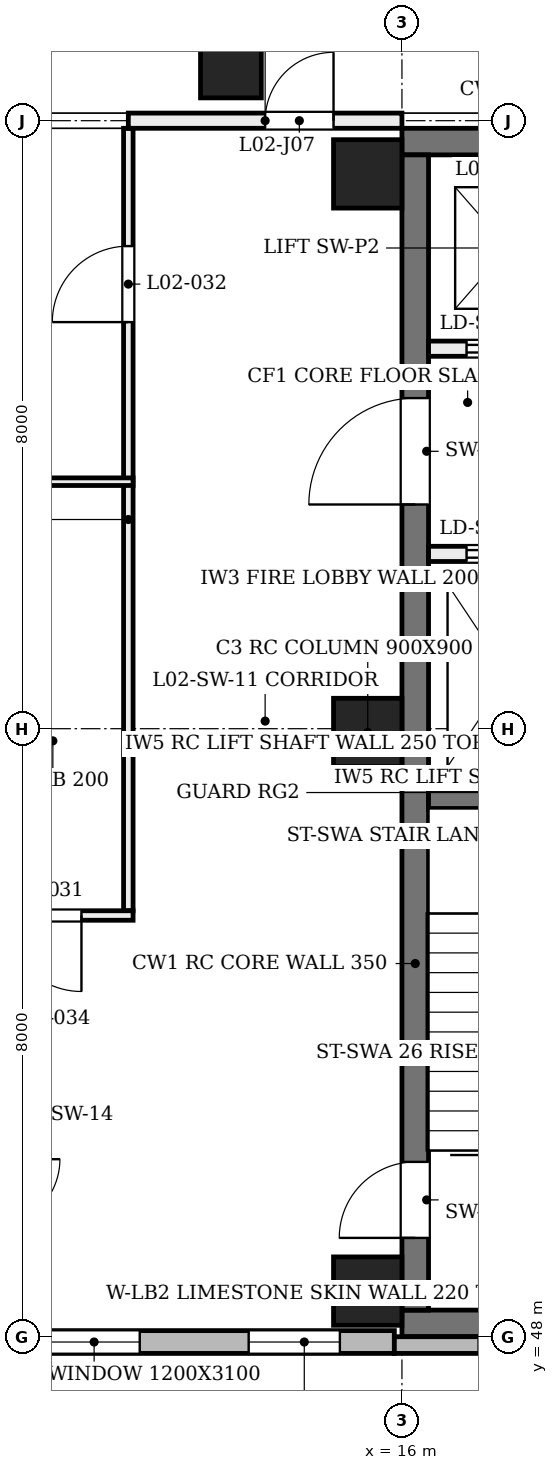
"""IFC4 building model, lengths in metres.
Left out: names, types, materials, properties, quantities, classifications, styles, units other than length and angle.
Written with IfcOpenShell. Run it as: python <this file> out.ifc"""

import sys

from ifc_helpers import new_model, si_unit, direction, frame, frame_2d, origin, origin_2d, place, context, subcontext, project, spatial, rectangle, extrude, element, fill, save


model = new_model("IFC4")
c1 = context("Model", 3, precision=1e-05, world=origin(), true_north=direction((0.0, 1.0)))
c2 = subcontext(c1, "Body", "Model", "MODEL_VIEW")
j1 = project(units=[si_unit("LENGTHUNIT", "METRE"), si_unit("PLANEANGLEUNIT", "RADIAN")], contexts=[c1])
p1 = place(None, origin())
s1 = spatial("IfcSite", under=j1, at=p1, CompositionType="ELEMENT")
p2 = place(p1, origin())
s2 = spatial("IfcBuilding", under=s1, at=p2, CompositionType="ELEMENT")
p3 = place(p2, frame((0.0, 0.0, 9.6)))
s3 = spatial("IfcBuildingStorey", under=s2, at=p3, CompositionType="ELEMENT", Elevation=9.6)
for number, where, z_axis, x_axis in (
    (1, (16.0, 48.175, 0.0), (0.0, 0.0, 1.0), (1.0, 0.0, 0.0)),
    (2, (16.0, 63.725, 0.0), (0.0, 0.0, 1.0), (1.0, 0.0, 0.0)),
):
    element("IfcWall", number, at=place(p3, frame(where, z_axis=z_axis, x_axis=x_axis)), inside=s3, PredefinedType="SHEAR", context=c2, shape_type="SweptSolid", body=[
        extrude(rectangle(XDim=7.9, YDim=0.35, at=frame_2d((3.95, 0.0))), origin(), (0.0, 0.0, 1.0), 4.58),
    ])
p4 = place(p3, frame((16.175, 48.35, 0.0), z_axis=(0.0, 0.0, 1.0), x_axis=(0.0, 1.0, 0.0)))
e3 = element("IfcWall", 3, at=p4, inside=s3, PredefinedType="SHEAR", context=c2, shape_type="SweptSolid", body=[
    extrude(rectangle(XDim=15.2, YDim=0.35, at=frame_2d((7.6, 0.0))), origin(), (0.0, 0.0, 1.0), 4.58),
])
p5 = place(p4, frame((0.95, 0.0, 0.0)))
e4 = element("IfcOpeningElement", 4, at=p5, cuts=e3, PredefinedType="OPENING", context=c2, shape_type="SweptSolid", body=[
    extrude(rectangle(XDim=1.0, YDim=2.1, at=frame_2d((0.5, 1.05))), frame((0.0, 0.185, 0.0), z_axis=(0.0, -1.0, 0.0), x_axis=(1.0, 0.0, 0.0)), (0.0, 0.0, 1.0), 0.37),
])
p6 = place(p4, frame((10.6, 0.0, 0.0)))
e5 = element("IfcOpeningElement", 5, at=p6, cuts=e3, PredefinedType="OPENING", context=c2, shape_type="SweptSolid", body=[
    extrude(rectangle(XDim=1.4, YDim=2.1, at=frame_2d((0.7, 1.05))), frame((0.0, 0.185, 0.0), z_axis=(0.0, -1.0, 0.0), x_axis=(1.0, 0.0, 0.0)), (0.0, 0.0, 1.0), 0.37),
])
for number, where, z_axis, x_axis in (
    (6, (15.55, 48.6, 0.0), (0.0, 0.0, 1.0), (1.0, 0.0, 0.0)),
    (7, (15.55, 55.95, 0.0), (0.0, 0.0, 1.0), (1.0, 0.0, 0.0)),
    (8, (15.55, 63.3, 0.0), (0.0, 0.0, 1.0), (1.0, 0.0, 0.0)),
):
    element("IfcColumn", number, at=place(p3, frame(where, z_axis=z_axis, x_axis=x_axis)), inside=s3, PredefinedType="COLUMN", context=c2, shape_type="SweptSolid", body=[
        extrude(rectangle(XDim=0.9, YDim=0.9, at=origin_2d()), origin(), (0.0, 0.0, 1.0), 4.8),
    ])
p7 = place(p3, frame((14.0, 64.7, 0.0), z_axis=(-0.203962208122, 0.0, 0.978978762618), x_axis=(0.0, -1.0, 0.0)))
e9 = element("IfcColumn", 9, at=p7, inside=s3, PredefinedType="COLUMN", context=c2, shape_type="SweptSolid", body=[
    extrude(rectangle(XDim=0.8, YDim=0.8, at=origin_2d()), origin(), (0.0, 0.0, 1.0), 4.903),
])
p8 = place(p3, frame((8.0, 47.93, 0.0), z_axis=(0.0, 0.0, 1.0), x_axis=(1.0, 0.0, 0.0)))
e10 = element("IfcWall", 10, at=p8, inside=s3, PredefinedType="SOLIDWALL", context=c2, shape_type="SweptSolid", body=[
    extrude(rectangle(XDim=7.9, YDim=0.3, at=frame_2d((3.95, 0.0))), origin(), (0.0, 0.0, 1.0), 3.9),
])
p9 = place(p8, frame((0.717, 0.0, 0.75)))
e11 = element("IfcOpeningElement", 11, at=p9, cuts=e10, PredefinedType="OPENING", context=c2, shape_type="SweptSolid", body=[
    extrude(rectangle(XDim=1.2, YDim=3.1, at=frame_2d((0.6, 1.55))), frame((0.0, 0.16, 0.0), z_axis=(0.0, -1.0, 0.0), x_axis=(1.0, 0.0, 0.0)), (0.0, 0.0, 1.0), 0.32),
])
p10 = place(p8, frame((3.35, 0.0, 0.75)))
e12 = element("IfcOpeningElement", 12, at=p10, cuts=e10, PredefinedType="OPENING", context=c2, shape_type="SweptSolid", body=[
    extrude(rectangle(XDim=1.2, YDim=3.1, at=frame_2d((0.6, 1.55))), frame((0.0, 0.16, 0.0), z_axis=(0.0, -1.0, 0.0), x_axis=(1.0, 0.0, 0.0)), (0.0, 0.0, 1.0), 0.32),
])
p11 = place(p8, frame((5.983, 0.0, 0.75)))
e13 = element("IfcOpeningElement", 13, at=p11, cuts=e10, PredefinedType="OPENING", context=c2, shape_type="SweptSolid", body=[
    extrude(rectangle(XDim=1.2, YDim=3.1, at=frame_2d((0.6, 1.55))), frame((0.0, 0.16, 0.0), z_axis=(0.0, -1.0, 0.0), x_axis=(1.0, 0.0, 0.0)), (0.0, 0.0, 1.0), 0.32),
])
p12 = place(p3, frame((15.9, 47.89, 0.0), z_axis=(0.0, 0.0, 1.0), x_axis=(1.0, 0.0, 0.0)))
e14 = element("IfcWall", 14, at=p12, inside=s3, PredefinedType="SOLIDWALL", context=c2, shape_type="SweptSolid", body=[
    extrude(rectangle(XDim=8.2, YDim=0.22, at=frame_2d((4.1, 0.0))), origin(), (0.0, 0.0, 1.0), 3.9),
])
p13 = place(p12, frame((1.108, 0.0, 0.9)))
e15 = element("IfcOpeningElement", 15, at=p13, cuts=e14, PredefinedType="OPENING", context=c2, shape_type="SweptSolid", body=[
    extrude(rectangle(XDim=0.45, YDim=2.6, at=frame_2d((0.225, 1.3))), frame((0.0, 0.12, 0.0), z_axis=(0.0, -1.0, 0.0), x_axis=(1.0, 0.0, 0.0)), (0.0, 0.0, 1.0), 0.24),
])
p14 = place(p12, frame((3.775, 0.0, 0.9)))
e16 = element("IfcOpeningElement", 16, at=p14, cuts=e14, PredefinedType="OPENING", context=c2, shape_type="SweptSolid", body=[
    extrude(rectangle(XDim=0.45, YDim=2.6, at=frame_2d((0.225, 1.3))), frame((0.0, 0.12, 0.0), z_axis=(0.0, -1.0, 0.0), x_axis=(1.0, 0.0, 0.0)), (0.0, 0.0, 1.0), 0.24),
])
p15 = place(p12, frame((6.442, 0.0, 0.9)))
e17 = element("IfcOpeningElement", 17, at=p15, cuts=e14, PredefinedType="OPENING", context=c2, shape_type="SweptSolid", body=[
    extrude(rectangle(XDim=0.45, YDim=2.6, at=frame_2d((0.225, 1.3))), frame((0.0, 0.12, 0.0), z_axis=(0.0, -1.0, 0.0), x_axis=(1.0, 0.0, 0.0)), (0.0, 0.0, 1.0), 0.24),
])
p16 = place(p3, frame((16.35, 55.075, 0.0), z_axis=(0.0, 0.0, 1.0), x_axis=(1.0, 0.0, 0.0)))
e18 = element("IfcWall", 18, at=p16, inside=s3, PredefinedType="SOLIDWALL", context=c2, shape_type="SweptSolid", body=[
    extrude(rectangle(XDim=3.1, YDim=0.25, at=frame_2d((1.55, 0.0))), origin(), (0.0, 0.0, 1.0), 4.55),
])
p17 = place(p3, frame((16.35, 58.3, 0.0), z_axis=(0.0, 0.0, 1.0), x_axis=(1.0, 0.0, 0.0)))
e19 = element("IfcWall", 19, at=p17, inside=s3, PredefinedType="SOLIDWALL", context=c2, shape_type="SweptSolid", body=[
    extrude(rectangle(XDim=7.2, YDim=0.2, at=frame_2d((3.6, 0.0))), origin(), (0.0, 0.0, 1.0), 4.55),
])
p18 = place(p17, frame((0.5, 0.0, 0.0)))
e20 = element("IfcOpeningElement", 20, at=p18, cuts=e19, PredefinedType="OPENING", context=c2, shape_type="SweptSolid", body=[
    extrude(rectangle(XDim=1.1, YDim=2.1, at=frame_2d((0.55, 1.05))), frame((0.0, 0.11, 0.0), z_axis=(0.0, -1.0, 0.0), x_axis=(1.0, 0.0, 0.0)), (0.0, 0.0, 1.0), 0.22),
])
p19 = place(p17, frame((5.6, 0.0, 0.0)))
e21 = element("IfcOpeningElement", 21, at=p19, cuts=e19, PredefinedType="OPENING", context=c2, shape_type="SweptSolid", body=[
    extrude(rectangle(XDim=1.1, YDim=2.1, at=frame_2d((0.55, 1.05))), frame((0.0, 0.11, 0.0), z_axis=(0.0, -1.0, 0.0), x_axis=(1.0, 0.0, 0.0)), (0.0, 0.0, 1.0), 0.22),
])
p20 = place(p17, frame((3.1, 0.0, 0.0)))
e22 = element("IfcOpeningElement", 22, at=p20, cuts=e19, PredefinedType="OPENING", context=c2, shape_type="SweptSolid", body=[
    extrude(rectangle(XDim=1.0, YDim=2.1, at=frame_2d((0.5, 1.05))), frame((0.0, 0.11, 0.0), z_axis=(0.0, -1.0, 0.0), x_axis=(1.0, 0.0, 0.0)), (0.0, 0.0, 1.0), 0.22),
])
p21 = place(p3, frame((16.35, 61.0, 0.0), z_axis=(0.0, 0.0, 1.0), x_axis=(1.0, 0.0, 0.0)))
e23 = element("IfcWall", 23, at=p21, inside=s3, PredefinedType="SOLIDWALL", context=c2, shape_type="SweptSolid", body=[
    extrude(rectangle(XDim=7.2, YDim=0.2, at=frame_2d((3.6, 0.0))), origin(), (0.0, 0.0, 1.0), 4.55),
])
p22 = place(p21, frame((0.5, 0.0, 0.0)))
e24 = element("IfcOpeningElement", 24, at=p22, cuts=e23, PredefinedType="OPENING", context=c2, shape_type="SweptSolid", body=[
    extrude(rectangle(XDim=1.1, YDim=2.1, at=frame_2d((0.55, 1.05))), frame((0.0, 0.11, 0.0), z_axis=(0.0, -1.0, 0.0), x_axis=(1.0, 0.0, 0.0)), (0.0, 0.0, 1.0), 0.22),
])
p23 = place(p21, frame((5.6, 0.0, 0.0)))
e25 = element("IfcOpeningElement", 25, at=p23, cuts=e23, PredefinedType="OPENING", context=c2, shape_type="SweptSolid", body=[
    extrude(rectangle(XDim=1.1, YDim=2.1, at=frame_2d((0.55, 1.05))), frame((0.0, 0.11, 0.0), z_axis=(0.0, -1.0, 0.0), x_axis=(1.0, 0.0, 0.0)), (0.0, 0.0, 1.0), 0.22),
])
p24 = place(p21, frame((3.1, 0.0, 0.0)))
e26 = element("IfcOpeningElement", 26, at=p24, cuts=e23, PredefinedType="OPENING", context=c2, shape_type="SweptSolid", body=[
    extrude(rectangle(XDim=1.0, YDim=2.1, at=frame_2d((0.5, 1.05))), frame((0.0, 0.11, 0.0), z_axis=(0.0, -1.0, 0.0), x_axis=(1.0, 0.0, 0.0)), (0.0, 0.0, 1.0), 0.22),
])
p25 = place(p3, frame((12.4, 53.605, 0.0), z_axis=(0.0, 0.0, 1.0), x_axis=(0.0, 1.0, 0.0)))
e27 = element("IfcWall", 27, at=p25, inside=s3, PredefinedType="PARTITIONING", context=c2, shape_type="SweptSolid", body=[
    extrude(rectangle(XDim=10.295, YDim=0.125, at=frame_2d((5.147, 0.0))), origin(), (0.0, 0.0, 1.0), 3.88),
])
p26 = place(p25, frame((7.745, 0.0, 0.0)))
e28 = element("IfcOpeningElement", 28, at=p26, cuts=e27, PredefinedType="OPENING", context=c2, shape_type="SweptSolid", body=[
    extrude(rectangle(XDim=1.0, YDim=2.1, at=frame_2d((0.5, 1.05))), frame((0.0, 0.073, 0.0), z_axis=(0.0, -1.0, 0.0), x_axis=(1.0, 0.0, 0.0)), (0.0, 0.0, 1.0), 0.145),
])
p27 = place(p3, frame((10.538, 53.542, 0.0), z_axis=(0.0, 0.0, 1.0), x_axis=(1.0, 0.0, 0.0)))
e29 = element("IfcWall", 29, at=p27, inside=s3, PredefinedType="PARTITIONING", context=c2, shape_type="SweptSolid", body=[
    extrude(rectangle(XDim=1.925, YDim=0.125, at=frame_2d((0.962, 0.0))), origin(), (0.0, 0.0, 1.0), 4.56),
])
p28 = place(p27, frame((0.246, 0.0, 0.0)))
e30 = element("IfcOpeningElement", 30, at=p28, cuts=e29, PredefinedType="OPENING", context=c2, shape_type="SweptSolid", body=[
    extrude(rectangle(XDim=1.0, YDim=2.1, at=frame_2d((0.5, 1.05))), frame((0.0, 0.073, 0.0), z_axis=(0.0, -1.0, 0.0), x_axis=(1.0, 0.0, 0.0)), (0.0, 0.0, 1.0), 0.145),
])
p29 = place(p3, frame((8.3, 59.25, 0.0), z_axis=(0.0, 0.0, 1.0), x_axis=(1.0, 0.0, 0.0)))
e31 = element("IfcWall", 31, at=p29, inside=s3, PredefinedType="PARTITIONING", context=c2, shape_type="SweptSolid", body=[
    extrude(rectangle(XDim=4.162, YDim=0.1, at=frame_2d((2.081, 0.0))), origin(), (0.0, 0.0, 1.0), 3.98),
])
p30 = place(p3, frame((12.4, 64.0, 0.0), z_axis=(0.0, 0.0, 1.0), x_axis=(1.0, 0.0, 0.0)))
e32 = element("IfcWall", 32, at=p30, inside=s3, PredefinedType="PARTITIONING", context=c2, shape_type="SweptSolid", body=[
    extrude(rectangle(XDim=3.6, YDim=0.2, at=frame_2d((1.8, 0.0))), origin(), (0.0, 0.0, 1.0), 3.88),
])
p31 = place(p30, frame((1.8, 0.0, 0.0)))
e33 = element("IfcOpeningElement", 33, at=p31, cuts=e32, PredefinedType="OPENING", context=c2, shape_type="SweptSolid", body=[
    extrude(rectangle(XDim=0.9, YDim=2.1, at=frame_2d((0.45, 1.05))), frame((0.0, 0.11, 0.0), z_axis=(0.0, -1.0, 0.0), x_axis=(1.0, 0.0, 0.0)), (0.0, 0.0, 1.0), 0.22),
])
p32 = place(p10, origin())
e34 = element("IfcWindow", 34, at=p32, inside=s3, PartitioningType="SINGLE_PANEL", PredefinedType="WINDOW", context=c2, shape_type="SweptSolid", body=[
    extrude(rectangle(XDim=1.2, YDim=3.1, at=frame_2d((0.6, 1.55))), frame((0.0, 0.03, 0.0), z_axis=(0.0, -1.0, 0.0), x_axis=(1.0, 0.0, 0.0)), (0.0, 0.0, 1.0), 0.06),
])
fill(e12, e34)
p33 = place(p11, origin())
e35 = element("IfcWindow", 35, at=p33, inside=s3, PartitioningType="SINGLE_PANEL", PredefinedType="WINDOW", context=c2, shape_type="SweptSolid", body=[
    extrude(rectangle(XDim=1.2, YDim=3.1, at=frame_2d((0.6, 1.55))), frame((0.0, 0.03, 0.0), z_axis=(0.0, -1.0, 0.0), x_axis=(1.0, 0.0, 0.0)), (0.0, 0.0, 1.0), 0.06),
])
fill(e13, e35)
p34 = place(p5, origin())
e36 = element("IfcDoor", 36, at=p34, inside=s3, OperationType="SINGLE_SWING_LEFT", PredefinedType="DOOR", context=c2, shape_type="SweptSolid", body=[
    extrude(rectangle(XDim=1.0, YDim=2.1, at=frame_2d((0.5, 1.05))), frame((0.0, 0.025, 0.0), z_axis=(0.0, -1.0, 0.0), x_axis=(1.0, 0.0, 0.0)), (0.0, 0.0, 1.0), 0.05),
])
fill(e4, e36)
p35 = place(p18, origin())
e37 = element("IfcDoor", 37, at=p35, inside=s3, OperationType="DOUBLE_DOOR_SLIDING", PredefinedType="DOOR", context=c2, shape_type="SweptSolid", body=[
    extrude(rectangle(XDim=1.1, YDim=2.1, at=frame_2d((0.55, 1.05))), frame((0.0, 0.025, 0.0), z_axis=(0.0, -1.0, 0.0), x_axis=(1.0, 0.0, 0.0)), (0.0, 0.0, 1.0), 0.05),
])
fill(e20, e37)
p36 = place(p22, frame((1.1, 0.0, 0.0), z_axis=(0.0, 0.0, 1.0), x_axis=(-1.0, 0.0, 0.0)))
e38 = element("IfcDoor", 38, at=p36, inside=s3, OperationType="DOUBLE_DOOR_SLIDING", PredefinedType="DOOR", context=c2, shape_type="SweptSolid", body=[
    extrude(rectangle(XDim=1.1, YDim=2.1, at=frame_2d((0.55, 1.05))), frame((0.0, 0.025, 0.0), z_axis=(0.0, -1.0, 0.0), x_axis=(1.0, 0.0, 0.0)), (0.0, 0.0, 1.0), 0.05),
])
fill(e24, e38)
p37 = place(p6, origin())
e39 = element("IfcDoor", 39, at=p37, inside=s3, OperationType="SINGLE_SWING_LEFT", PredefinedType="DOOR", context=c2, shape_type="SweptSolid", body=[
    extrude(rectangle(XDim=1.4, YDim=2.1, at=frame_2d((0.7, 1.05))), frame((0.0, 0.025, 0.0), z_axis=(0.0, -1.0, 0.0), x_axis=(1.0, 0.0, 0.0)), (0.0, 0.0, 1.0), 0.05),
])
fill(e5, e39)
p38 = place(p28, origin())
e40 = element("IfcDoor", 40, at=p38, inside=s3, OperationType="SINGLE_SWING_RIGHT", PredefinedType="DOOR", context=c2, shape_type="SweptSolid", body=[
    extrude(rectangle(XDim=1.0, YDim=2.1, at=frame_2d((0.5, 1.05))), frame((0.0, 0.025, 0.0), z_axis=(0.0, -1.0, 0.0), x_axis=(1.0, 0.0, 0.0)), (0.0, 0.0, 1.0), 0.05),
])
fill(e30, e40)
p39 = place(p26, origin())
e41 = element("IfcDoor", 41, at=p39, inside=s3, OperationType="SINGLE_SWING_LEFT", PredefinedType="DOOR", context=c2, shape_type="SweptSolid", body=[
    extrude(rectangle(XDim=1.0, YDim=2.1, at=frame_2d((0.5, 1.05))), frame((0.0, 0.025, 0.0), z_axis=(0.0, -1.0, 0.0), x_axis=(1.0, 0.0, 0.0)), (0.0, 0.0, 1.0), 0.05),
])
fill(e28, e41)
p40 = place(p31, frame((0.9, 0.0, 0.0), z_axis=(0.0, 0.0, 1.0), x_axis=(-1.0, 0.0, 0.0)))
e42 = element("IfcDoor", 42, at=p40, inside=s3, OperationType="SINGLE_SWING_RIGHT", PredefinedType="DOOR", context=c2, shape_type="SweptSolid", body=[
    extrude(rectangle(XDim=0.9, YDim=2.1, at=frame_2d((0.45, 1.05))), frame((0.0, 0.025, 0.0), z_axis=(0.0, -1.0, 0.0), x_axis=(1.0, 0.0, 0.0)), (0.0, 0.0, 1.0), 0.05),
])
fill(e33, e42)
save(model, sys.argv[1])
